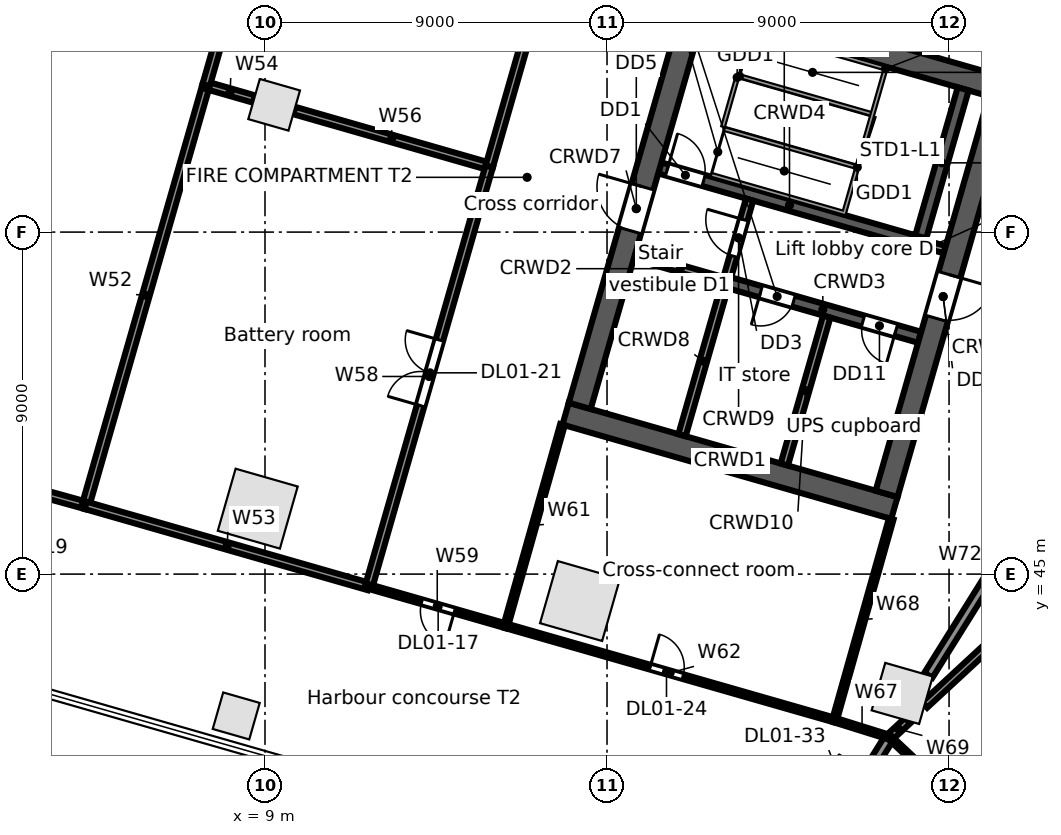
"""IFC4 building model, lengths in metres.
Left out: names, types, materials, properties, quantities, classifications, styles, units other than length and angle.
Written with IfcOpenShell. Run it as: python <this file> out.ifc"""

import sys

from ifc_helpers import new_model, si_unit, direction, frame, frame_2d, origin, origin_2d, place, context, subcontext, project, spatial, rectangle, extrude, element, fill, save


model = new_model("IFC4")
c1 = context("Model", 3, precision=1e-05, world=origin(), true_north=direction((0.0, 1.0)))
c2 = subcontext(c1, "Body", "Model", "MODEL_VIEW")
j1 = project(units=[si_unit("LENGTHUNIT", "METRE"), si_unit("PLANEANGLEUNIT", "RADIAN")], contexts=[c1])
p1 = place(None, origin())
s1 = spatial("IfcSite", under=j1, at=p1, CompositionType="ELEMENT")
p2 = place(p1, origin())
s2 = spatial("IfcBuilding", under=s1, at=p2, CompositionType="ELEMENT")
p3 = place(p2, frame((0.0, 0.0, 6.5)))
s3 = spatial("IfcBuildingStorey", under=s2, at=p3, CompositionType="ELEMENT", Elevation=6.5)
for number, where, z_axis, x_axis in (
    (1, (8.81, 46.722, 0.0), (0.0, 0.0, 1.0), (0.961, -0.276, 0.0)),
    (2, (17.288, 44.291, 0.0), (0.0, 0.0, 1.0), (0.961, -0.276, 0.0)),
):
    element("IfcColumn", number, at=place(p3, frame(where, z_axis=z_axis, x_axis=x_axis)), inside=s3, PredefinedType="COLUMN", context=c2, shape_type="SweptSolid", body=[
        extrude(rectangle(XDim=1.7, YDim=1.7, at=origin_2d()), origin(), (0.0, 0.0, 1.0), 5.0),
    ])
p4 = place(p3, frame((25.767, 41.86, 0.0), z_axis=(0.0, 0.0, 1.0), x_axis=(0.961261695938, -0.275637355817, 0.0)))
e3 = element("IfcColumn", 3, at=p4, inside=s3, PredefinedType="COLUMN", context=c2, shape_type="SweptSolid", body=[
    extrude(rectangle(XDim=1.3, YDim=1.3, at=origin_2d()), origin(), (0.0, 0.0, 1.0), 5.0),
])
p5 = place(p3, frame((8.243, 41.267, 0.0), z_axis=(0.0, 0.0, 1.0), x_axis=(0.961261695938, -0.275637355817, 0.0)))
e4 = element("IfcColumn", 4, at=p5, inside=s3, PredefinedType="COLUMN", context=c2, shape_type="SweptSolid", body=[
    extrude(rectangle(XDim=1.0, YDim=1.0, at=origin_2d()), origin(), (0.0, 0.0, 1.0), 5.0),
])
p6 = place(p3, frame((9.241, 57.35, 0.0), z_axis=(0.0, 0.0, 1.0), x_axis=(0.961261695938, -0.275637355817, 0.0)))
e5 = element("IfcColumn", 5, at=p6, inside=s3, PredefinedType="COLUMN", context=c2, shape_type="SweptSolid", body=[
    extrude(rectangle(XDim=1.1, YDim=1.1, at=origin_2d()), origin(), (0.0, 0.0, 1.0), 5.0),
])
p7 = place(p3, frame((16.911, 49.221, 0.0), z_axis=(0.0, 0.0, 1.0), x_axis=(0.96126248289, -0.275634611374, 0.0)))
e6 = element("IfcWall", 6, at=p7, inside=s3, PredefinedType="SOLIDWALL", context=c2, shape_type="SweptSolid", body=[
    extrude(rectangle(XDim=9.0, YDim=0.6, at=frame_2d((4.5, 0.0))), origin(), (0.0, 0.0, 1.0), 4.65),
])
p8 = place(p3, frame((18.728, 53.382, 0.0), z_axis=(0.0, 0.0, 1.0), x_axis=(0.961247070632, -0.275688355216, 0.0)))
e7 = element("IfcWall", 7, at=p8, inside=s3, PredefinedType="SOLIDWALL", context=c2, shape_type="SweptSolid", body=[
    extrude(rectangle(XDim=2.5, YDim=0.2, at=frame_2d((1.25, 0.0))), origin(), (0.0, 0.0, 1.0), 4.65),
])
p9 = place(p3, frame((21.131, 52.692, 0.0), z_axis=(0.0, 0.0, 1.0), x_axis=(0.961271492568, -0.275603188616, 0.0)))
e8 = element("IfcWall", 8, at=p9, inside=s3, PredefinedType="SOLIDWALL", context=c2, shape_type="SweptSolid", body=[
    extrude(rectangle(XDim=5.3, YDim=0.3, at=frame_2d((2.65, 0.0))), origin(), (0.0, 0.0, 1.0), 4.65),
])
p10 = place(p9, frame((0.95, 0.0, 0.0)))
e9 = element("IfcOpeningElement", 9, at=p10, cuts=e8, PredefinedType="OPENING", context=c2, shape_type="SweptSolid", body=[
    extrude(rectangle(XDim=0.9, YDim=2.1, at=frame_2d((0.45, 1.05))), frame((0.0, 0.16, 0.0), z_axis=(0.0, -1.0, 0.0), x_axis=(1.0, 0.0, 0.0)), (0.0, 0.0, 1.0), 0.32),
])
p11 = place(p9, frame((3.75, 0.0, 0.0)))
e10 = element("IfcOpeningElement", 10, at=p11, cuts=e8, PredefinedType="OPENING", context=c2, shape_type="SweptSolid", body=[
    extrude(rectangle(XDim=0.9, YDim=2.1, at=frame_2d((0.45, 1.05))), frame((0.0, 0.16, 0.0), z_axis=(0.0, -1.0, 0.0), x_axis=(1.0, 0.0, 0.0)), (0.0, 0.0, 1.0), 0.32),
])
p12 = place(p3, frame((19.389, 55.689, 0.0), z_axis=(0.0, 0.0, 1.0), x_axis=(0.961261397636, -0.275638396117, 0.0)))
e11 = element("IfcWall", 11, at=p12, inside=s3, PredefinedType="SOLIDWALL", context=c2, shape_type="SweptSolid", body=[
    extrude(rectangle(XDim=7.1, YDim=0.3, at=frame_2d((3.55, 0.0))), origin(), (0.0, 0.0, 1.0), 4.65),
])
p13 = place(p12, frame((0.2, 0.0, 0.0)))
e12 = element("IfcOpeningElement", 12, at=p13, cuts=e11, PredefinedType="OPENING", context=c2, shape_type="SweptSolid", body=[
    extrude(rectangle(XDim=1.0, YDim=2.1, at=frame_2d((0.5, 1.05))), frame((0.0, 0.16, 0.0), z_axis=(0.0, -1.0, 0.0), x_axis=(1.0, 0.0, 0.0)), (0.0, 0.0, 1.0), 0.32),
])
p14 = place(p3, frame((26.214, 53.732, 0.0), z_axis=(0.0, 0.0, 1.0), x_axis=(0.96122076476, -0.27578005982, 0.0)))
e13 = element("IfcWall", 13, at=p14, inside=s3, PredefinedType="SOLIDWALL", context=c2, shape_type="SweptSolid", body=[
    extrude(rectangle(XDim=0.7, YDim=0.2, at=frame_2d((0.35, 0.0))), origin(), (0.0, 0.0, 1.0), 4.65),
])
p15 = place(p3, frame((20.053, 60.18, 0.0), z_axis=(0.0, 0.0, 1.0), x_axis=(0.96126248289, -0.275634611374, 0.0)))
e14 = element("IfcWall", 14, at=p15, inside=s3, PredefinedType="SOLIDWALL", context=c2, shape_type="SweptSolid", body=[
    extrude(rectangle(XDim=9.0, YDim=0.6, at=frame_2d((4.5, 0.0))), origin(), (0.0, 0.0, 1.0), 4.65),
])
p16 = place(p3, frame((17.282, 49.427, 0.0), z_axis=(0.0, 0.0, 1.0), x_axis=(0.275631631629, 0.961263337304, 0.0)))
e15 = element("IfcWall", 15, at=p16, inside=s3, PredefinedType="SOLIDWALL", context=c2, shape_type="SweptSolid", body=[
    extrude(rectangle(XDim=10.8, YDim=0.6, at=frame_2d((5.4, 0.0))), origin(), (0.0, 0.0, 1.0), 4.65),
])
p17 = place(p16, frame((4.8, 0.0, 0.0)))
e16 = element("IfcOpeningElement", 16, at=p17, cuts=e15, PredefinedType="OPENING", context=c2, shape_type="SweptSolid", body=[
    extrude(rectangle(XDim=1.2, YDim=2.1, at=frame_2d((0.6, 1.05))), frame((0.0, 0.31, 0.0), z_axis=(0.0, -1.0, 0.0), x_axis=(1.0, 0.0, 0.0)), (0.0, 0.0, 1.0), 0.62),
])
p18 = place(p3, frame((19.973, 48.655, 0.0), z_axis=(0.0, 0.0, 1.0), x_axis=(0.275668441653, 0.961252781674, 0.0)))
e17 = element("IfcWall", 17, at=p18, inside=s3, PredefinedType="SOLIDWALL", context=c2, shape_type="SweptSolid", body=[
    extrude(rectangle(XDim=4.05, YDim=0.2, at=frame_2d((2.025, 0.0))), origin(), (0.0, 0.0, 1.0), 4.65),
])
p19 = place(p3, frame((21.172, 52.837, 0.0), z_axis=(0.0, 0.0, 1.0), x_axis=(0.275657676022, 0.961255868981, 0.0)))
e18 = element("IfcWall", 18, at=p19, inside=s3, PredefinedType="PARTITIONING", context=c2, shape_type="SweptSolid", body=[
    extrude(rectangle(XDim=2.1, YDim=0.2, at=frame_2d((1.05, 0.0))), origin(), (0.0, 0.0, 1.0), 4.65),
])
p20 = place(p19, frame((0.55, 0.0, 0.0)))
e19 = element("IfcOpeningElement", 19, at=p20, cuts=e18, PredefinedType="OPENING", context=c2, shape_type="SweptSolid", body=[
    extrude(rectangle(XDim=1.0, YDim=2.1, at=frame_2d((0.5, 1.05))), frame((0.0, 0.11, 0.0), z_axis=(0.0, -1.0, 0.0), x_axis=(1.0, 0.0, 0.0)), (0.0, 0.0, 1.0), 0.22),
])
p21 = place(p3, frame((22.665, 47.883, 0.0), z_axis=(0.0, 0.0, 1.0), x_axis=(0.275596769212, 0.961273333033, 0.0)))
e20 = element("IfcWall", 20, at=p21, inside=s3, PredefinedType="PARTITIONING", context=c2, shape_type="SweptSolid", body=[
    extrude(rectangle(XDim=4.05, YDim=0.2, at=frame_2d((2.025, 0.0))), origin(), (0.0, 0.0, 1.0), 4.65),
])
p22 = place(p3, frame((26.256, 53.876, 0.0), z_axis=(0.0, 0.0, 1.0), x_axis=(0.275612739511, 0.961268754209, 0.0)))
e21 = element("IfcWall", 21, at=p22, inside=s3, PredefinedType="SOLIDWALL", context=c2, shape_type="SweptSolid", body=[
    extrude(rectangle(XDim=4.05, YDim=0.3, at=frame_2d((2.025, 0.0))), origin(), (0.0, 0.0, 1.0), 4.65),
])
p23 = place(p3, frame((25.356, 47.112, 0.0), z_axis=(0.0, 0.0, 1.0), x_axis=(0.275631631629, 0.961263337304, 0.0)))
e22 = element("IfcWall", 22, at=p23, inside=s3, PredefinedType="SOLIDWALL", context=c2, shape_type="SweptSolid", body=[
    extrude(rectangle(XDim=10.8, YDim=0.6, at=frame_2d((5.4, 0.0))), origin(), (0.0, 0.0, 1.0), 4.65),
])
p24 = place(p23, frame((4.8, 0.0, 0.0)))
e23 = element("IfcOpeningElement", 23, at=p24, cuts=e22, PredefinedType="OPENING", context=c2, shape_type="SweptSolid", body=[
    extrude(rectangle(XDim=1.2, YDim=2.1, at=frame_2d((0.6, 1.05))), frame((0.0, 0.31, 0.0), z_axis=(0.0, -1.0, 0.0), x_axis=(1.0, 0.0, 0.0)), (0.0, 0.0, 1.0), 0.62),
])
p25 = place(p3, frame((0.0, 48.0, 0.0), z_axis=(0.0, 0.0, 1.0), x_axis=(0.963400508162, -0.268066150181, 0.0)))
e24 = element("IfcWall", 24, at=p25, inside=s3, PredefinedType="PARTITIONING", context=c2, shape_type="SweptSolid", body=[
    extrude(rectangle(XDim=4.443, YDim=0.2, at=frame_2d((2.221, 0.0))), origin(), (0.0, 0.0, 1.0), 4.65),
])
p26 = place(p25, frame((1.2, 0.0, 0.0)))
e25 = element("IfcOpeningElement", 25, at=p26, cuts=e24, PredefinedType="OPENING", context=c2, shape_type="SweptSolid", body=[
    extrude(rectangle(XDim=1.8, YDim=2.1, at=frame_2d((0.9, 1.05))), frame((0.0, 0.11, 0.0), z_axis=(0.0, -1.0, 0.0), x_axis=(1.0, 0.0, 0.0)), (0.0, 0.0, 1.0), 0.22),
])
p27 = place(p3, frame((4.28, 46.809, 0.0), z_axis=(0.0, 0.0, 1.0), x_axis=(0.275635044812, 0.961262358605, 0.0)))
e26 = element("IfcWall", 26, at=p27, inside=s3, PredefinedType="PARTITIONING", context=c2, shape_type="SweptSolid", body=[
    extrude(rectangle(XDim=11.5, YDim=0.2, at=frame_2d((5.75, 0.0))), origin(), (0.0, 0.0, 1.0), 3.712),
])
p28 = place(p3, frame((4.28, 46.809, 0.0), z_axis=(0.0, 0.0, 1.0), x_axis=(0.961270337968, -0.275607215693, 0.0)))
e27 = element("IfcWall", 27, at=p28, inside=s3, PredefinedType="PARTITIONING", context=c2, shape_type="SweptSolid", body=[
    extrude(rectangle(XDim=7.75, YDim=0.2, at=frame_2d((3.875, 0.0))), origin(), (0.0, 0.0, 1.0), 4.03),
])
p29 = place(p3, frame((7.45, 57.864, 0.0), z_axis=(0.0, 0.0, 1.0), x_axis=(0.961221622993, -0.275777068465, 0.0)))
e28 = element("IfcWall", 28, at=p29, inside=s3, PredefinedType="PARTITIONING", context=c2, shape_type="SweptSolid", body=[
    extrude(rectangle(XDim=1.313, YDim=0.2, at=frame_2d((0.656, 0.0))), origin(), (0.0, 0.0, 1.0), 3.712),
])
p30 = place(p3, frame((7.45, 57.864, 0.0), z_axis=(0.0, 0.0, 1.0), x_axis=(0.275710305557, 0.961240774941, 0.0)))
e29 = element("IfcWall", 29, at=p30, inside=s3, PredefinedType="PARTITIONING", context=c2, shape_type="SweptSolid", body=[
    extrude(rectangle(XDim=9.485, YDim=0.2, at=frame_2d((4.742, 0.0))), origin(), (0.0, 0.0, 1.0), 3.712),
])
p31 = place(p3, frame((9.77, 57.199, 0.0), z_axis=(0.0, 0.0, 1.0), x_axis=(0.961262835898, -0.275633380273, 0.0)))
e30 = element("IfcWall", 30, at=p31, inside=s3, PredefinedType="PARTITIONING", context=c2, shape_type="SweptSolid", body=[
    extrude(rectangle(XDim=5.337, YDim=0.2, at=frame_2d((2.668, 0.0))), origin(), (0.0, 0.0, 1.0), 3.712),
])
p32 = place(p3, frame((11.73, 44.673, 0.0), z_axis=(0.0, 0.0, 1.0), x_axis=(0.275635044812, 0.961262358605, 0.0)))
e31 = element("IfcWall", 31, at=p32, inside=s3, PredefinedType="PARTITIONING", context=c2, shape_type="SweptSolid", body=[
    extrude(rectangle(XDim=11.5, YDim=0.2, at=frame_2d((5.75, 0.0))), origin(), (0.0, 0.0, 1.0), 3.712),
])
p33 = place(p32, frame((4.95, 0.0, 0.0)))
e32 = element("IfcOpeningElement", 32, at=p33, cuts=e31, PredefinedType="OPENING", context=c2, shape_type="SweptSolid", body=[
    extrude(rectangle(XDim=1.8, YDim=2.1, at=frame_2d((0.9, 1.05))), frame((0.0, 0.11, 0.0), z_axis=(0.0, -1.0, 0.0), x_axis=(1.0, 0.0, 0.0)), (0.0, 0.0, 1.0), 0.22),
])
p34 = place(p3, frame((11.73, 44.673, 0.0), z_axis=(0.0, 0.0, 1.0), x_axis=(0.961228613303, -0.275752702557, 0.0)))
e33 = element("IfcWall", 33, at=p34, inside=s3, PredefinedType="PARTITIONING", context=c2, shape_type="SweptSolid", body=[
    extrude(rectangle(XDim=3.75, YDim=0.125, at=frame_2d((1.875, 0.0))), origin(), (0.0, 0.0, 1.0), 4.65),
])
p35 = place(p34, frame((1.45, 0.0, 0.0)))
e34 = element("IfcOpeningElement", 34, at=p35, cuts=e33, PredefinedType="OPENING", context=c2, shape_type="SweptSolid", body=[
    extrude(rectangle(XDim=0.9, YDim=2.1, at=frame_2d((0.45, 1.05))), frame((0.0, 0.073, 0.0), z_axis=(0.0, -1.0, 0.0), x_axis=(1.0, 0.0, 0.0)), (0.0, 0.0, 1.0), 0.145),
])
p36 = place(p3, frame((14.9, 55.728, 0.0), z_axis=(0.0, 0.0, 1.0), x_axis=(0.27559869205, 0.961272781754, 0.0)))
e35 = element("IfcWall", 35, at=p36, inside=s3, PredefinedType="PARTITIONING", context=c2, shape_type="SweptSolid", body=[
    extrude(rectangle(XDim=11.499, YDim=0.2, at=frame_2d((5.75, 0.0))), origin(), (0.0, 0.0, 1.0), 3.712),
])
p37 = place(p36, frame((4.95, 0.0, 0.0)))
e36 = element("IfcOpeningElement", 36, at=p37, cuts=e35, PredefinedType="OPENING", context=c2, shape_type="SweptSolid", body=[
    extrude(rectangle(XDim=1.8, YDim=2.1, at=frame_2d((0.9, 1.05))), frame((0.0, 0.11, 0.0), z_axis=(0.0, -1.0, 0.0), x_axis=(1.0, 0.0, 0.0)), (0.0, 0.0, 1.0), 0.22),
])
p38 = place(p3, frame((15.335, 43.639, 0.0), z_axis=(0.0, 0.0, 1.0), x_axis=(0.271407455373, 0.962464541252, 0.0)))
e37 = element("IfcWall", 37, at=p38, inside=s3, PredefinedType="PARTITIONING", context=c2, shape_type="SweptSolid", body=[
    extrude(rectangle(XDim=5.501, YDim=0.125, at=frame_2d((2.75, 0.0))), origin(), (0.0, 0.0, 1.0), 3.93),
])
p39 = place(p3, frame((15.335, 43.639, 0.0), z_axis=(0.0, 0.0, 1.0), x_axis=(0.961281982754, -0.275566597455, 0.0)))
e38 = element("IfcWall", 38, at=p39, inside=s3, PredefinedType="PARTITIONING", context=c2, shape_type="SweptSolid", body=[
    extrude(rectangle(XDim=9.0, YDim=0.125, at=frame_2d((4.5, 0.0))), origin(), (0.0, 0.0, 1.0), 3.822),
])
p40 = place(p39, frame((3.95, 0.0, 0.0)))
e39 = element("IfcOpeningElement", 39, at=p40, cuts=e38, PredefinedType="OPENING", context=c2, shape_type="SweptSolid", body=[
    extrude(rectangle(XDim=0.9, YDim=2.1, at=frame_2d((0.45, 1.05))), frame((0.0, 0.073, 0.0), z_axis=(0.0, -1.0, 0.0), x_axis=(1.0, 0.0, 0.0)), (0.0, 0.0, 1.0), 0.145),
])
p41 = place(p3, frame((23.397, 37.442, 0.0), z_axis=(0.0, 0.0, 1.0), x_axis=(0.529805058875, 0.848119448893, 0.0)))
e40 = element("IfcWall", 40, at=p41, inside=s3, PredefinedType="PARTITIONING", context=c2, shape_type="SweptSolid", body=[
    extrude(rectangle(XDim=3.849, YDim=0.25, at=frame_2d((1.924, 0.0))), origin(), (0.0, 0.0, 1.0), 3.712),
])
p42 = place(p41, frame((0.95, 0.0, 0.0)))
e41 = element("IfcOpeningElement", 41, at=p42, cuts=e40, PredefinedType="OPENING", context=c2, shape_type="SweptSolid", body=[
    extrude(rectangle(XDim=1.8, YDim=2.1, at=frame_2d((0.9, 1.05))), frame((0.0, 0.135, 0.0), z_axis=(0.0, -1.0, 0.0), x_axis=(1.0, 0.0, 0.0)), (0.0, 0.0, 1.0), 0.27),
])
p43 = place(p3, frame((23.986, 41.159, 0.0), z_axis=(0.0, 0.0, 1.0), x_axis=(0.954522865266, -0.298137719325, 0.0)))
e42 = element("IfcWall", 42, at=p43, inside=s3, PredefinedType="PARTITIONING", context=c2, shape_type="SweptSolid", body=[
    extrude(rectangle(XDim=1.519, YDim=0.125, at=frame_2d((0.76, 0.0))), origin(), (0.0, 0.0, 1.0), 3.712),
])
p44 = place(p3, frame((23.986, 41.159, 0.0), z_axis=(0.0, 0.0, 1.0), x_axis=(0.271465437068, 0.962448188983, 0.0)))
e43 = element("IfcWall", 43, at=p44, inside=s3, PredefinedType="PARTITIONING", context=c2, shape_type="SweptSolid", body=[
    extrude(rectangle(XDim=5.5, YDim=0.125, at=frame_2d((2.75, 0.0))), origin(), (0.0, 0.0, 1.0), 3.93),
])
p45 = place(p3, frame((25.436, 40.706, 0.0), z_axis=(0.0, 0.0, 1.0), x_axis=(0.733725630695, 0.679445876329, 0.0)))
e44 = element("IfcWall", 44, at=p45, inside=s3, PredefinedType="PARTITIONING", context=c2, shape_type="SweptSolid", body=[
    extrude(rectangle(XDim=0.643, YDim=0.2, at=frame_2d((0.322, 0.0))), origin(), (0.0, 0.0, 1.0), 4.65),
])
p46 = place(p3, frame((25.436, 40.706, 0.0), z_axis=(0.0, 0.0, 1.0), x_axis=(0.729011488135, -0.684501461041, 0.0)))
e45 = element("IfcWall", 45, at=p46, inside=s3, PredefinedType="PARTITIONING", context=c2, shape_type="SweptSolid", body=[
    extrude(rectangle(XDim=4.202, YDim=0.125, at=frame_2d((2.101, 0.0))), origin(), (0.0, 0.0, 1.0), 4.65),
])
p47 = place(p46, frame((1.7, 0.0, 0.0)))
e46 = element("IfcOpeningElement", 46, at=p47, cuts=e45, PredefinedType="OPENING", context=c2, shape_type="SweptSolid", body=[
    extrude(rectangle(XDim=0.9, YDim=2.1, at=frame_2d((0.45, 1.05))), frame((0.0, 0.073, 0.0), z_axis=(0.0, -1.0, 0.0), x_axis=(1.0, 0.0, 0.0)), (0.0, 0.0, 1.0), 0.145),
])
p48 = place(p3, frame((26.356, 41.557, 0.0), z_axis=(0.0, 0.0, 1.0), x_axis=(0.734047402287, 0.679098233834, 0.0)))
e47 = element("IfcWall", 47, at=p48, inside=s3, PredefinedType="PARTITIONING", context=c2, shape_type="SweptSolid", body=[
    extrude(rectangle(XDim=21.926, YDim=0.2, at=frame_2d((10.963, 0.0))), origin(), (0.0, 0.0, 1.0), 3.73),
])
p49 = place(p48, frame((9.95, 0.0, 0.0)))
e48 = element("IfcOpeningElement", 48, at=p49, cuts=e47, PredefinedType="OPENING", context=c2, shape_type="SweptSolid", body=[
    extrude(rectangle(XDim=1.8, YDim=2.1, at=frame_2d((0.9, 1.05))), frame((0.0, 0.11, 0.0), z_axis=(0.0, -1.0, 0.0), x_axis=(1.0, 0.0, 0.0)), (0.0, 0.0, 1.0), 0.22),
])
p50 = place(p3, frame((26.456, 42.338, 0.0), z_axis=(0.0, 0.0, 1.0), x_axis=(0.529836963461, 0.848099517834, 0.0)))
e49 = element("IfcWall", 49, at=p50, inside=s3, PredefinedType="PARTITIONING", context=c2, shape_type="SweptSolid", body=[
    extrude(rectangle(XDim=5.826, YDim=0.25, at=frame_2d((2.913, 0.0))), origin(), (0.0, 0.0, 1.0), 3.712),
])
p51 = place(p13, origin())
e50 = element("IfcDoor", 50, at=p51, inside=s3, OperationType="SINGLE_SWING_LEFT", PredefinedType="DOOR", context=c2, shape_type="SweptSolid", body=[
    extrude(rectangle(XDim=1.0, YDim=2.1, at=frame_2d((0.5, 1.05))), frame((0.0, 0.025, 0.0), z_axis=(0.0, -1.0, 0.0), x_axis=(1.0, 0.0, 0.0)), (0.0, 0.0, 1.0), 0.05),
])
fill(e12, e50)
p52 = place(p20, origin())
e51 = element("IfcDoor", 51, at=p52, inside=s3, OperationType="SINGLE_SWING_RIGHT", PredefinedType="DOOR", context=c2, shape_type="SweptSolid", body=[
    extrude(rectangle(XDim=1.0, YDim=2.1, at=frame_2d((0.5, 1.05))), frame((0.0, 0.025, 0.0), z_axis=(0.0, -1.0, 0.0), x_axis=(1.0, 0.0, 0.0)), (0.0, 0.0, 1.0), 0.05),
])
fill(e19, e51)
p53 = place(p17, origin())
e52 = element("IfcDoor", 52, at=p53, inside=s3, OperationType="SINGLE_SWING_RIGHT", PredefinedType="DOOR", context=c2, shape_type="SweptSolid", body=[
    extrude(rectangle(XDim=1.2, YDim=2.1, at=frame_2d((0.6, 1.05))), frame((0.0, 0.025, 0.0), z_axis=(0.0, -1.0, 0.0), x_axis=(1.0, 0.0, 0.0)), (0.0, 0.0, 1.0), 0.05),
])
fill(e16, e52)
p54 = place(p24, frame((1.2, 0.0, 0.0), z_axis=(0.0, 0.0, 1.0), x_axis=(-1.0, 0.0, 0.0)))
e53 = element("IfcDoor", 53, at=p54, inside=s3, OperationType="SINGLE_SWING_LEFT", PredefinedType="DOOR", context=c2, shape_type="SweptSolid", body=[
    extrude(rectangle(XDim=1.2, YDim=2.1, at=frame_2d((0.6, 1.05))), frame((0.0, 0.025, 0.0), z_axis=(0.0, -1.0, 0.0), x_axis=(1.0, 0.0, 0.0)), (0.0, 0.0, 1.0), 0.05),
])
fill(e23, e53)
p55 = place(p10, frame((0.9, 0.0, 0.0), z_axis=(0.0, 0.0, 1.0), x_axis=(-1.0, 0.0, 0.0)))
e54 = element("IfcDoor", 54, at=p55, inside=s3, OperationType="SINGLE_SWING_RIGHT", PredefinedType="DOOR", context=c2, shape_type="SweptSolid", body=[
    extrude(rectangle(XDim=0.9, YDim=2.1, at=frame_2d((0.45, 1.05))), frame((0.0, 0.025, 0.0), z_axis=(0.0, -1.0, 0.0), x_axis=(1.0, 0.0, 0.0)), (0.0, 0.0, 1.0), 0.05),
])
fill(e9, e54)
p56 = place(p11, frame((0.9, 0.0, 0.0), z_axis=(0.0, 0.0, 1.0), x_axis=(-1.0, 0.0, 0.0)))
e55 = element("IfcDoor", 55, at=p56, inside=s3, OperationType="SINGLE_SWING_LEFT", PredefinedType="DOOR", context=c2, shape_type="SweptSolid", body=[
    extrude(rectangle(XDim=0.9, YDim=2.1, at=frame_2d((0.45, 1.05))), frame((0.0, 0.025, 0.0), z_axis=(0.0, -1.0, 0.0), x_axis=(1.0, 0.0, 0.0)), (0.0, 0.0, 1.0), 0.05),
])
fill(e10, e55)
p57 = place(p35, frame((0.9, 0.0, 0.0), z_axis=(0.0, 0.0, 1.0), x_axis=(-1.0, 0.0, 0.0)))
e56 = element("IfcDoor", 56, at=p57, inside=s3, OperationType="SINGLE_SWING_LEFT", PredefinedType="DOOR", context=c2, shape_type="SweptSolid", body=[
    extrude(rectangle(XDim=0.9, YDim=2.1, at=frame_2d((0.45, 1.05))), frame((0.0, 0.025, 0.0), z_axis=(0.0, -1.0, 0.0), x_axis=(1.0, 0.0, 0.0)), (0.0, 0.0, 1.0), 0.05),
])
fill(e34, e56)
p58 = place(p33, origin())
e57 = element("IfcDoor", 57, at=p58, inside=s3, OperationType="DOUBLE_DOOR_SINGLE_SWING", PredefinedType="DOOR", context=c2, shape_type="SweptSolid", body=[
    extrude(rectangle(XDim=1.8, YDim=2.1, at=frame_2d((0.9, 1.05))), frame((0.0, 0.025, 0.0), z_axis=(0.0, -1.0, 0.0), x_axis=(1.0, 0.0, 0.0)), (0.0, 0.0, 1.0), 0.05),
])
fill(e32, e57)
p59 = place(p40, origin())
e58 = element("IfcDoor", 58, at=p59, inside=s3, OperationType="SINGLE_SWING_LEFT", PredefinedType="DOOR", context=c2, shape_type="SweptSolid", body=[
    extrude(rectangle(XDim=0.9, YDim=2.1, at=frame_2d((0.45, 1.05))), frame((0.0, 0.025, 0.0), z_axis=(0.0, -1.0, 0.0), x_axis=(1.0, 0.0, 0.0)), (0.0, 0.0, 1.0), 0.05),
])
fill(e39, e58)
save(model, sys.argv[1])
